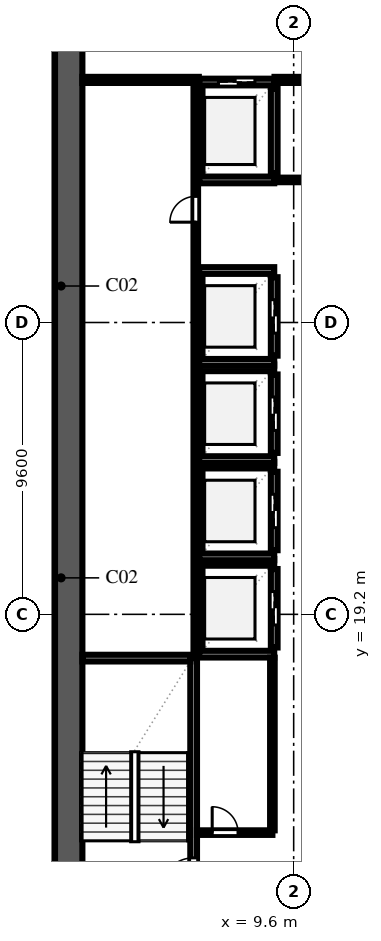
"""IFC4 building model, lengths in metres.
Left out: names, types, materials, properties, quantities, classifications, styles, units other than length and angle.
Written with IfcOpenShell. Run it as: python <this file> out.ifc"""

import sys

from ifc_helpers import new_model, si_unit, direction, frame, frame_2d, origin, place, context, subcontext, project, spatial, rectangle, extrude, element, fill, save


model = new_model("IFC4")
c1 = context("Model", 3, precision=1e-05, world=origin(), true_north=direction((0.0, 1.0)))
c2 = subcontext(c1, "Body", "Model", "MODEL_VIEW")
j1 = project(units=[si_unit("LENGTHUNIT", "METRE"), si_unit("PLANEANGLEUNIT", "RADIAN")], contexts=[c1])
p1 = place(None, origin())
s1 = spatial("IfcSite", under=j1, at=p1, CompositionType="ELEMENT")
p2 = place(p1, origin())
s2 = spatial("IfcBuilding", under=s1, at=p2, CompositionType="ELEMENT")
p3 = place(p2, frame((0.0, 0.0, 47.0)))
s3 = spatial("IfcBuildingStorey", under=s2, at=p3, CompositionType="ELEMENT", Elevation=47.0)
p4 = place(p3, frame((2.2, 9.15, 0.0), z_axis=(0.0, 0.0, 1.0), x_axis=(0.0, 1.0, 0.0)))
e1 = element("IfcWall", 1, at=p4, inside=s3, PredefinedType="SHEAR", context=c2, shape_type="SweptSolid", body=[
    extrude(rectangle(XDim=39.3, YDim=0.9, at=frame_2d((19.65, 0.0))), origin(), (0.0, 0.0, 1.0), 3.54),
])
p5 = place(p3, frame((6.31, 9.95, 0.0), z_axis=(0.0, 0.0, 1.0), x_axis=(0.0, 1.0, 0.0)))
e2 = element("IfcWall", 2, at=p5, inside=s3, PredefinedType="SOLIDWALL", context=c2, shape_type="SweptSolid", body=[
    extrude(rectangle(XDim=7.81, YDim=0.22, at=frame_2d((3.905, 0.0))), origin(), (0.0, 0.0, 1.0), 3.54),
])
p6 = place(p5, frame((0.14, 0.0, 0.0)))
e3 = element("IfcOpeningElement", 3, at=p6, cuts=e2, PredefinedType="OPENING", context=c2, shape_type="SweptSolid", body=[
    extrude(rectangle(XDim=1.1, YDim=2.2, at=frame_2d((0.55, 1.1))), frame((0.0, 0.122, 0.0), z_axis=(0.0, -1.0, 0.0), x_axis=(1.0, 0.0, 0.0)), (0.0, 0.0, 1.0), 0.244),
])
p7 = place(p3, frame((2.65, 17.76, 0.0), z_axis=(0.0, 0.0, 1.0), x_axis=(1.0, 0.0, 0.0)))
e4 = element("IfcWall", 4, at=p7, inside=s3, PredefinedType="SOLIDWALL", context=c2, shape_type="SweptSolid", body=[
    extrude(rectangle(XDim=3.55, YDim=0.22, at=frame_2d((1.775, 0.0))), origin(), (0.0, 0.0, 1.0), 3.54),
])
p8 = place(p3, frame((6.49, 18.11, 0.0), z_axis=(0.0, 0.0, 1.0), x_axis=(0.0, 1.0, 0.0)))
e5 = element("IfcWall", 5, at=p8, inside=s3, PredefinedType="SOLIDWALL", context=c2, shape_type="SweptSolid", body=[
    extrude(rectangle(XDim=2.58, YDim=0.22, at=frame_2d((1.29, 0.0))), origin(), (0.0, 0.0, 1.0), 3.54),
])
p9 = place(p3, frame((8.96, 18.11, 0.0), z_axis=(0.0, 0.0, 1.0), x_axis=(0.0, 1.0, 0.0)))
e6 = element("IfcWall", 6, at=p9, inside=s3, PredefinedType="SOLIDWALL", context=c2, shape_type="SweptSolid", body=[
    extrude(rectangle(XDim=2.58, YDim=0.22, at=frame_2d((1.29, 0.0))), origin(), (0.0, 0.0, 1.0), 3.54),
])
p10 = place(p9, frame((0.74, 0.0, 0.0)))
e7 = element("IfcOpeningElement", 7, at=p10, cuts=e6, PredefinedType="OPENING", context=c2, shape_type="SweptSolid", body=[
    extrude(rectangle(XDim=1.1, YDim=2.2, at=frame_2d((0.55, 1.1))), frame((0.0, 0.122, 0.0), z_axis=(0.0, -1.0, 0.0), x_axis=(1.0, 0.0, 0.0)), (0.0, 0.0, 1.0), 0.244),
])
for number, where, z_axis, x_axis in (
    (8, (6.49, 17.89, 0.0), (0.0, 0.0, 1.0), (1.0, 0.0, 0.0)),
    (9, (6.49, 20.91, 0.0), (0.0, 0.0, 1.0), (1.0, 0.0, 0.0)),
):
    element("IfcWall", number, at=place(p3, frame(where, z_axis=z_axis, x_axis=x_axis)), inside=s3, PredefinedType="SOLIDWALL", context=c2, shape_type="SweptSolid", body=[
        extrude(rectangle(XDim=2.47, YDim=0.22, at=frame_2d((1.235, 0.0))), origin(), (0.0, 0.0, 1.0), 3.54),
    ])
p11 = place(p3, frame((6.49, 21.31, 0.0), z_axis=(0.0, 0.0, 1.0), x_axis=(0.0, 1.0, 0.0)))
e10 = element("IfcWall", 10, at=p11, inside=s3, PredefinedType="SOLIDWALL", context=c2, shape_type="SweptSolid", body=[
    extrude(rectangle(XDim=2.58, YDim=0.22, at=frame_2d((1.29, 0.0))), origin(), (0.0, 0.0, 1.0), 3.54),
])
p12 = place(p3, frame((8.96, 21.31, 0.0), z_axis=(0.0, 0.0, 1.0), x_axis=(0.0, 1.0, 0.0)))
e11 = element("IfcWall", 11, at=p12, inside=s3, PredefinedType="SOLIDWALL", context=c2, shape_type="SweptSolid", body=[
    extrude(rectangle(XDim=2.58, YDim=0.22, at=frame_2d((1.29, 0.0))), origin(), (0.0, 0.0, 1.0), 3.54),
])
p13 = place(p12, frame((0.74, 0.0, 0.0)))
e12 = element("IfcOpeningElement", 12, at=p13, cuts=e11, PredefinedType="OPENING", context=c2, shape_type="SweptSolid", body=[
    extrude(rectangle(XDim=1.1, YDim=2.2, at=frame_2d((0.55, 1.1))), frame((0.0, 0.122, 0.0), z_axis=(0.0, -1.0, 0.0), x_axis=(1.0, 0.0, 0.0)), (0.0, 0.0, 1.0), 0.244),
])
for number, where, z_axis, x_axis in (
    (13, (6.49, 21.09, 0.0), (0.0, 0.0, 1.0), (1.0, 0.0, 0.0)),
    (14, (6.49, 24.11, 0.0), (0.0, 0.0, 1.0), (1.0, 0.0, 0.0)),
):
    element("IfcWall", number, at=place(p3, frame(where, z_axis=z_axis, x_axis=x_axis)), inside=s3, PredefinedType="SOLIDWALL", context=c2, shape_type="SweptSolid", body=[
        extrude(rectangle(XDim=2.47, YDim=0.22, at=frame_2d((1.235, 0.0))), origin(), (0.0, 0.0, 1.0), 3.54),
    ])
p14 = place(p3, frame((6.49, 24.51, 0.0), z_axis=(0.0, 0.0, 1.0), x_axis=(0.0, 1.0, 0.0)))
e15 = element("IfcWall", 15, at=p14, inside=s3, PredefinedType="SOLIDWALL", context=c2, shape_type="SweptSolid", body=[
    extrude(rectangle(XDim=2.58, YDim=0.22, at=frame_2d((1.29, 0.0))), origin(), (0.0, 0.0, 1.0), 3.54),
])
p15 = place(p3, frame((8.96, 24.51, 0.0), z_axis=(0.0, 0.0, 1.0), x_axis=(0.0, 1.0, 0.0)))
e16 = element("IfcWall", 16, at=p15, inside=s3, PredefinedType="SOLIDWALL", context=c2, shape_type="SweptSolid", body=[
    extrude(rectangle(XDim=2.58, YDim=0.22, at=frame_2d((1.29, 0.0))), origin(), (0.0, 0.0, 1.0), 3.54),
])
p16 = place(p15, frame((0.74, 0.0, 0.0)))
e17 = element("IfcOpeningElement", 17, at=p16, cuts=e16, PredefinedType="OPENING", context=c2, shape_type="SweptSolid", body=[
    extrude(rectangle(XDim=1.1, YDim=2.2, at=frame_2d((0.55, 1.1))), frame((0.0, 0.122, 0.0), z_axis=(0.0, -1.0, 0.0), x_axis=(1.0, 0.0, 0.0)), (0.0, 0.0, 1.0), 0.244),
])
for number, where, z_axis, x_axis in (
    (18, (6.49, 24.29, 0.0), (0.0, 0.0, 1.0), (1.0, 0.0, 0.0)),
    (19, (6.49, 27.31, 0.0), (0.0, 0.0, 1.0), (1.0, 0.0, 0.0)),
):
    element("IfcWall", number, at=place(p3, frame(where, z_axis=z_axis, x_axis=x_axis)), inside=s3, PredefinedType="SOLIDWALL", context=c2, shape_type="SweptSolid", body=[
        extrude(rectangle(XDim=2.47, YDim=0.22, at=frame_2d((1.235, 0.0))), origin(), (0.0, 0.0, 1.0), 3.54),
    ])
p17 = place(p3, frame((6.49, 27.71, 0.0), z_axis=(0.0, 0.0, 1.0), x_axis=(0.0, 1.0, 0.0)))
e20 = element("IfcWall", 20, at=p17, inside=s3, PredefinedType="SOLIDWALL", context=c2, shape_type="SweptSolid", body=[
    extrude(rectangle(XDim=2.58, YDim=0.22, at=frame_2d((1.29, 0.0))), origin(), (0.0, 0.0, 1.0), 3.54),
])
p18 = place(p3, frame((8.96, 27.71, 0.0), z_axis=(0.0, 0.0, 1.0), x_axis=(0.0, 1.0, 0.0)))
e21 = element("IfcWall", 21, at=p18, inside=s3, PredefinedType="SOLIDWALL", context=c2, shape_type="SweptSolid", body=[
    extrude(rectangle(XDim=2.58, YDim=0.22, at=frame_2d((1.29, 0.0))), origin(), (0.0, 0.0, 1.0), 3.54),
])
p19 = place(p18, frame((0.74, 0.0, 0.0)))
e22 = element("IfcOpeningElement", 22, at=p19, cuts=e21, PredefinedType="OPENING", context=c2, shape_type="SweptSolid", body=[
    extrude(rectangle(XDim=1.1, YDim=2.2, at=frame_2d((0.55, 1.1))), frame((0.0, 0.122, 0.0), z_axis=(0.0, -1.0, 0.0), x_axis=(1.0, 0.0, 0.0)), (0.0, 0.0, 1.0), 0.244),
])
for number, where, z_axis, x_axis in (
    (23, (6.49, 27.49, 0.0), (0.0, 0.0, 1.0), (1.0, 0.0, 0.0)),
    (24, (6.49, 30.51, 0.0), (0.0, 0.0, 1.0), (1.0, 0.0, 0.0)),
):
    element("IfcWall", number, at=place(p3, frame(where, z_axis=z_axis, x_axis=x_axis)), inside=s3, PredefinedType="SOLIDWALL", context=c2, shape_type="SweptSolid", body=[
        extrude(rectangle(XDim=2.47, YDim=0.22, at=frame_2d((1.235, 0.0))), origin(), (0.0, 0.0, 1.0), 3.54),
    ])
for number, where, z_axis, x_axis in (
    (25, (6.49, 33.71, 0.0), (0.0, 0.0, 1.0), (0.0, 1.0, 0.0)),
    (26, (8.96, 33.71, 0.0), (0.0, 0.0, 1.0), (0.0, 1.0, 0.0)),
):
    element("IfcWall", number, at=place(p3, frame(where, z_axis=z_axis, x_axis=x_axis)), inside=s3, PredefinedType="SOLIDWALL", context=c2, shape_type="SweptSolid", body=[
        extrude(rectangle(XDim=2.78, YDim=0.22, at=frame_2d((1.39, 0.0))), origin(), (0.0, 0.0, 1.0), 3.54),
    ])
p20 = place(p3, frame((6.49, 33.49, 0.0), z_axis=(0.0, 0.0, 1.0), x_axis=(1.0, 0.0, 0.0)))
e27 = element("IfcWall", 27, at=p20, inside=s3, PredefinedType="SOLIDWALL", context=c2, shape_type="SweptSolid", body=[
    extrude(rectangle(XDim=2.47, YDim=0.22, at=frame_2d((1.235, 0.0))), origin(), (0.0, 0.0, 1.0), 3.54),
])
p21 = place(p3, frame((6.49, 36.71, 0.0), z_axis=(0.0, 0.0, 1.0), x_axis=(1.0, 0.0, 0.0)))
e28 = element("IfcWall", 28, at=p21, inside=s3, PredefinedType="SOLIDWALL", context=c2, shape_type="SweptSolid", body=[
    extrude(rectangle(XDim=2.47, YDim=0.22, at=frame_2d((1.235, 0.0))), origin(), (0.0, 0.0, 1.0), 3.54),
])
p22 = place(p21, frame((0.635, 0.0, 0.0)))
e29 = element("IfcOpeningElement", 29, at=p22, cuts=e28, PredefinedType="OPENING", context=c2, shape_type="SweptSolid", body=[
    extrude(rectangle(XDim=1.2, YDim=2.2, at=frame_2d((0.6, 1.1))), frame((0.0, 0.122, 0.0), z_axis=(0.0, -1.0, 0.0), x_axis=(1.0, 0.0, 0.0)), (0.0, 0.0, 1.0), 0.244),
])
p23 = place(p3, frame((2.65, 36.78, 0.0), z_axis=(0.0, 0.0, 1.0), x_axis=(1.0, 0.0, 0.0)))
e30 = element("IfcWall", 30, at=p23, inside=s3, PredefinedType="SOLIDWALL", context=c2, shape_type="SweptSolid", body=[
    extrude(rectangle(XDim=3.83, YDim=0.2, at=frame_2d((1.915, 0.0))), origin(), (0.0, 0.0, 1.0), 3.54),
])
p24 = place(p3, frame((8.97, 36.78, 0.0), z_axis=(0.0, 0.0, 1.0), x_axis=(1.0, 0.0, 0.0)))
e31 = element("IfcWall", 31, at=p24, inside=s3, PredefinedType="SOLIDWALL", context=c2, shape_type="SweptSolid", body=[
    extrude(rectangle(XDim=1.51, YDim=0.2, at=frame_2d((0.755, 0.0))), origin(), (0.0, 0.0, 1.0), 3.54),
])
p25 = place(p3, frame((8.965, 33.49, 0.0), z_axis=(0.0, 0.0, 1.0), x_axis=(1.0, 0.0, 0.0)))
e32 = element("IfcWall", 32, at=p25, inside=s3, PredefinedType="PARTITIONING", context=c2, shape_type="SweptSolid", body=[
    extrude(rectangle(XDim=1.52, YDim=0.15, at=frame_2d((0.76, 0.0))), origin(), (0.0, 0.0, 1.0), 3.54),
])
p26 = place(p3, frame((6.42, 12.02, 0.0), z_axis=(0.0, 0.0, 1.0), x_axis=(1.0, 0.0, 0.0)))
e33 = element("IfcWall", 33, at=p26, inside=s3, PredefinedType="PARTITIONING", context=c2, shape_type="SweptSolid", body=[
    extrude(rectangle(XDim=2.48, YDim=0.15, at=frame_2d((1.24, 0.0))), origin(), (0.0, 0.0, 1.0), 3.54),
])
p27 = place(p26, frame((0.5, 0.0, 0.0)))
e34 = element("IfcOpeningElement", 34, at=p27, cuts=e33, PredefinedType="OPENING", context=c2, shape_type="SweptSolid", body=[
    extrude(rectangle(XDim=0.85, YDim=2.1, at=frame_2d((0.425, 1.05))), frame((0.0, 0.087, 0.0), z_axis=(0.0, -1.0, 0.0), x_axis=(1.0, 0.0, 0.0)), (0.0, 0.0, 1.0), 0.174),
])
p28 = place(p3, frame((8.9, 12.095, 0.0), z_axis=(0.0, 0.0, 1.0), x_axis=(0.0, 1.0, 0.0)))
e35 = element("IfcWall", 35, at=p28, inside=s3, PredefinedType="PARTITIONING", context=c2, shape_type="SweptSolid", body=[
    extrude(rectangle(XDim=5.68, YDim=0.15, at=frame_2d((2.84, 0.0))), origin(), (0.0, 0.0, 1.0), 3.54),
])
p29 = place(p3, frame((6.38, 17.8, 0.0), z_axis=(0.0, 0.0, 1.0), x_axis=(0.0, 1.0, 0.0)))
e36 = element("IfcWall", 36, at=p29, inside=s3, PredefinedType="PARTITIONING", context=c2, shape_type="SweptSolid", body=[
    extrude(rectangle(XDim=18.98, YDim=0.15, at=frame_2d((9.49, 0.0))), origin(), (0.0, 0.0, 1.0), 3.54),
])
p30 = place(p29, frame((14.3, 0.0, 0.0)))
e37 = element("IfcOpeningElement", 37, at=p30, cuts=e36, PredefinedType="OPENING", context=c2, shape_type="SweptSolid", body=[
    extrude(rectangle(XDim=0.85, YDim=2.1, at=frame_2d((0.425, 1.05))), frame((0.0, 0.087, 0.0), z_axis=(0.0, -1.0, 0.0), x_axis=(1.0, 0.0, 0.0)), (0.0, 0.0, 1.0), 0.174),
])
p31 = place(p6, origin())
e38 = element("IfcDoor", 38, at=p31, inside=s3, OperationType="SINGLE_SWING_LEFT", PredefinedType="DOOR", context=c2, shape_type="SweptSolid", body=[
    extrude(rectangle(XDim=1.1, YDim=2.2, at=frame_2d((0.55, 1.1))), frame((0.0, 0.025, 0.0), z_axis=(0.0, -1.0, 0.0), x_axis=(1.0, 0.0, 0.0)), (0.0, 0.0, 1.0), 0.05),
])
fill(e3, e38)
p32 = place(p10, origin())
e39 = element("IfcDoor", 39, at=p32, inside=s3, OperationType="DOUBLE_DOOR_SLIDING", PredefinedType="DOOR", context=c2, shape_type="SweptSolid", body=[
    extrude(rectangle(XDim=1.1, YDim=2.2, at=frame_2d((0.55, 1.1))), frame((0.0, 0.025, 0.0), z_axis=(0.0, -1.0, 0.0), x_axis=(1.0, 0.0, 0.0)), (0.0, 0.0, 1.0), 0.05),
])
fill(e7, e39)
p33 = place(p13, origin())
e40 = element("IfcDoor", 40, at=p33, inside=s3, OperationType="DOUBLE_DOOR_SLIDING", PredefinedType="DOOR", context=c2, shape_type="SweptSolid", body=[
    extrude(rectangle(XDim=1.1, YDim=2.2, at=frame_2d((0.55, 1.1))), frame((0.0, 0.025, 0.0), z_axis=(0.0, -1.0, 0.0), x_axis=(1.0, 0.0, 0.0)), (0.0, 0.0, 1.0), 0.05),
])
fill(e12, e40)
p34 = place(p16, origin())
e41 = element("IfcDoor", 41, at=p34, inside=s3, OperationType="DOUBLE_DOOR_SLIDING", PredefinedType="DOOR", context=c2, shape_type="SweptSolid", body=[
    extrude(rectangle(XDim=1.1, YDim=2.2, at=frame_2d((0.55, 1.1))), frame((0.0, 0.025, 0.0), z_axis=(0.0, -1.0, 0.0), x_axis=(1.0, 0.0, 0.0)), (0.0, 0.0, 1.0), 0.05),
])
fill(e17, e41)
p35 = place(p19, origin())
e42 = element("IfcDoor", 42, at=p35, inside=s3, OperationType="DOUBLE_DOOR_SLIDING", PredefinedType="DOOR", context=c2, shape_type="SweptSolid", body=[
    extrude(rectangle(XDim=1.1, YDim=2.2, at=frame_2d((0.55, 1.1))), frame((0.0, 0.025, 0.0), z_axis=(0.0, -1.0, 0.0), x_axis=(1.0, 0.0, 0.0)), (0.0, 0.0, 1.0), 0.05),
])
fill(e22, e42)
p36 = place(p22, origin())
e43 = element("IfcDoor", 43, at=p36, inside=s3, OperationType="DOUBLE_DOOR_SLIDING", PredefinedType="DOOR", context=c2, shape_type="SweptSolid", body=[
    extrude(rectangle(XDim=1.2, YDim=2.2, at=frame_2d((0.6, 1.1))), frame((0.0, 0.025, 0.0), z_axis=(0.0, -1.0, 0.0), x_axis=(1.0, 0.0, 0.0)), (0.0, 0.0, 1.0), 0.05),
])
fill(e29, e43)
p37 = place(p27, origin())
e44 = element("IfcDoor", 44, at=p37, inside=s3, OperationType="SINGLE_SWING_LEFT", PredefinedType="DOOR", context=c2, shape_type="SweptSolid", body=[
    extrude(rectangle(XDim=0.85, YDim=2.1, at=frame_2d((0.425, 1.05))), frame((0.0, 0.025, 0.0), z_axis=(0.0, -1.0, 0.0), x_axis=(1.0, 0.0, 0.0)), (0.0, 0.0, 1.0), 0.05),
])
fill(e34, e44)
p38 = place(p30, origin())
e45 = element("IfcDoor", 45, at=p38, inside=s3, OperationType="SINGLE_SWING_LEFT", PredefinedType="DOOR", context=c2, shape_type="SweptSolid", body=[
    extrude(rectangle(XDim=0.85, YDim=2.1, at=frame_2d((0.425, 1.05))), frame((0.0, 0.025, 0.0), z_axis=(0.0, -1.0, 0.0), x_axis=(1.0, 0.0, 0.0)), (0.0, 0.0, 1.0), 0.05),
])
fill(e37, e45)
save(model, sys.argv[1])
